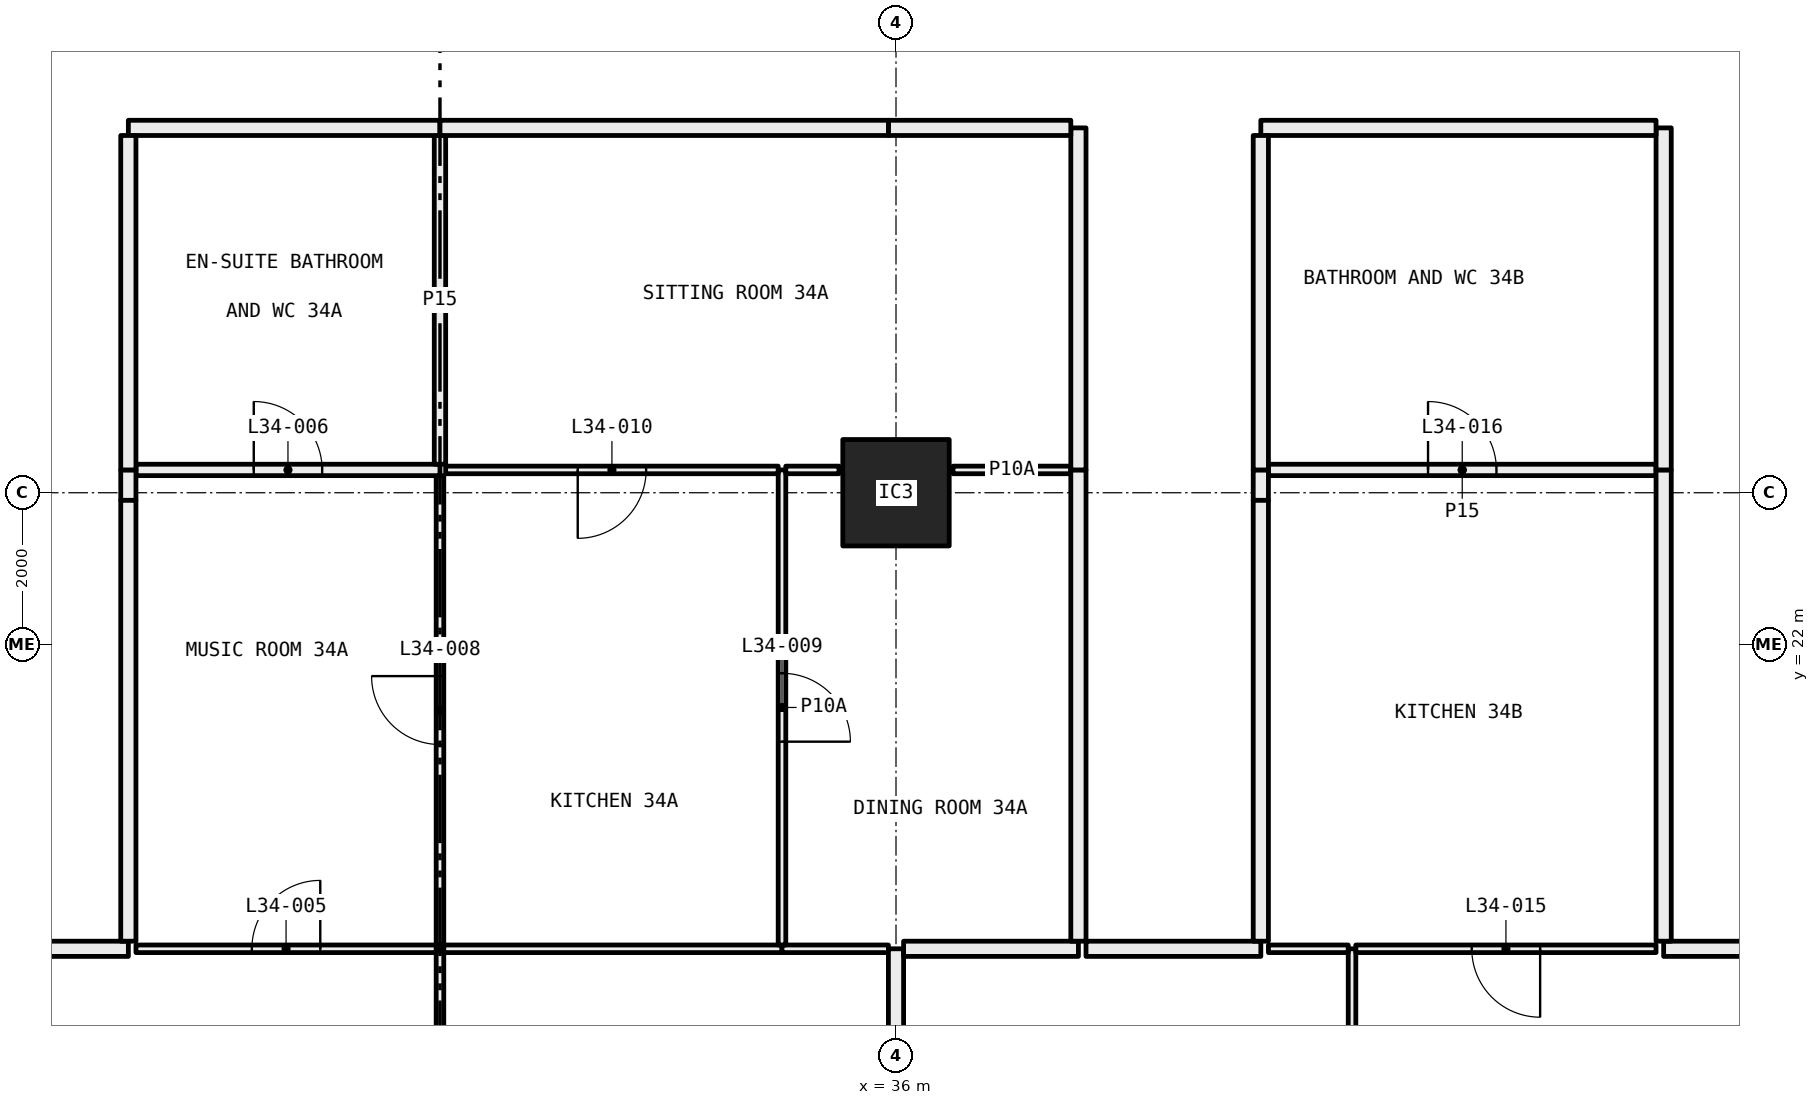
"""IFC4 building model, lengths in metres.
Left out: names, types, materials, properties, quantities, classifications, styles, units other than length and angle.
Written with IfcOpenShell. Run it as: python <this file> out.ifc"""

import sys

from ifc_helpers import new_model, si_unit, direction, frame, frame_2d, origin, origin_2d, place, context, subcontext, project, spatial, rectangle, hollow_rectangle, extrude, element, fill, save


model = new_model("IFC4")
c1 = context("Model", 3, precision=1e-05, world=origin(), true_north=direction((0.0, 1.0)))
c2 = subcontext(c1, "Body", "Model", "MODEL_VIEW")
j1 = project(units=[si_unit("LENGTHUNIT", "METRE"), si_unit("PLANEANGLEUNIT", "RADIAN")], contexts=[c1])
p1 = place(None, origin())
s1 = spatial("IfcSite", under=j1, at=p1, CompositionType="ELEMENT")
p2 = place(p1, origin())
s2 = spatial("IfcBuilding", under=s1, at=p2, CompositionType="ELEMENT")
p3 = place(p2, frame((0.0, 0.0, 131.1)))
s3 = spatial("IfcBuildingStorey", under=s2, at=p3, CompositionType="ELEMENT", Elevation=131.1)
p4 = place(p3, frame((36.0, 24.0, 0.0), z_axis=(0.0, 0.0, 1.0), x_axis=(1.0, 0.0, 0.0)))
e1 = element("IfcColumn", 1, at=p4, inside=s3, PredefinedType="COLUMN", context=c2, shape_type="SweptSolid", body=[
    extrude(hollow_rectangle(XDim=1.4, YDim=1.4, WallThickness=0.06, at=origin_2d()), origin(), (0.0, 0.0, 1.0), 3.05),
])
p5 = place(p3, frame((30.0, 12.72, 0.0), z_axis=(0.0, 0.0, 1.0), x_axis=(0.0, 1.0, 0.0)))
e2 = element("IfcWall", 2, at=p5, inside=s3, PredefinedType="PARTITIONING", context=c2, shape_type="SweptSolid", body=[
    extrude(rectangle(XDim=5.28, YDim=0.1, at=frame_2d((2.64, 0.0))), origin(), (0.0, 0.0, 1.0), 3.05),
])
p6 = place(p5, frame((2.19, 0.0, 0.0)))
e3 = element("IfcOpeningElement", 3, at=p6, cuts=e2, PredefinedType="OPENING", context=c2, shape_type="SweptSolid", body=[
    extrude(rectangle(XDim=0.9, YDim=2.1, at=frame_2d((0.45, 1.05))), frame((0.0, 0.06, 0.0), z_axis=(0.0, -1.0, 0.0), x_axis=(1.0, 0.0, 0.0)), (0.0, 0.0, 1.0), 0.12),
])
p7 = place(p3, frame((29.95, 18.0, 0.0), z_axis=(0.0, 0.0, 1.0), x_axis=(-1.0, 0.0, 0.0)))
e4 = element("IfcWall", 4, at=p7, inside=s3, PredefinedType="PARTITIONING", context=c2, shape_type="SweptSolid", body=[
    extrude(rectangle(XDim=3.95, YDim=0.1, at=frame_2d((1.975, 0.0))), origin(), (0.0, 0.0, 1.0), 3.05),
])
p8 = place(p7, frame((1.525, 0.0, 0.0)))
e5 = element("IfcOpeningElement", 5, at=p8, cuts=e4, PredefinedType="OPENING", context=c2, shape_type="SweptSolid", body=[
    extrude(rectangle(XDim=0.9, YDim=2.1, at=frame_2d((0.45, 1.05))), frame((0.0, 0.06, 0.0), z_axis=(0.0, -1.0, 0.0), x_axis=(1.0, 0.0, 0.0)), (0.0, 0.0, 1.0), 0.12),
])
p9 = place(p3, frame((25.9, 18.0, 0.0), z_axis=(0.0, 0.0, 1.0), x_axis=(-1.0, 0.0, 0.0)))
e6 = element("IfcWall", 6, at=p9, inside=s3, PredefinedType="PARTITIONING", context=c2, shape_type="SweptSolid", body=[
    extrude(rectangle(XDim=1.9, YDim=0.2, at=frame_2d((0.95, 0.0))), origin(), (0.0, 0.0, 1.0), 3.05),
])
p10 = place(p3, frame((34.5, 18.0, 0.0), z_axis=(0.0, 0.0, 1.0), x_axis=(-1.0, 0.0, 0.0)))
e7 = element("IfcWall", 7, at=p10, inside=s3, PredefinedType="PARTITIONING", context=c2, shape_type="SweptSolid", body=[
    extrude(rectangle(XDim=4.45, YDim=0.1, at=frame_2d((2.225, 0.0))), origin(), (0.0, 0.0, 1.0), 3.05),
])
p11 = place(p3, frame((35.9, 18.0, 0.0), z_axis=(0.0, 0.0, 1.0), x_axis=(-1.0, 0.0, 0.0)))
e8 = element("IfcWall", 8, at=p11, inside=s3, PredefinedType="PARTITIONING", context=c2, shape_type="SweptSolid", body=[
    extrude(rectangle(XDim=1.4, YDim=0.1, at=frame_2d((0.7, 0.0))), origin(), (0.0, 0.0, 1.0), 3.05),
])
p12 = place(p3, frame((36.0, 12.72, 0.0), z_axis=(0.0, 0.0, 1.0), x_axis=(0.0, 1.0, 0.0)))
e9 = element("IfcWall", 9, at=p12, inside=s3, PredefinedType="PARTITIONING", context=c2, shape_type="SweptSolid", body=[
    extrude(rectangle(XDim=5.28, YDim=0.2, at=frame_2d((2.64, 0.0))), origin(), (0.0, 0.0, 1.0), 2.45),
])
p13 = place(p3, frame((30.0, 18.05, 0.0), z_axis=(0.0, 0.0, 1.0), x_axis=(0.0, 1.0, 0.0)))
e10 = element("IfcWall", 10, at=p13, inside=s3, PredefinedType="PARTITIONING", context=c2, shape_type="SweptSolid", body=[
    extrude(rectangle(XDim=6.175, YDim=0.1, at=frame_2d((3.087, 0.0))), origin(), (0.0, 0.0, 1.0), 2.45),
])
p14 = place(p13, frame((2.637, 0.0, 0.0)))
e11 = element("IfcOpeningElement", 11, at=p14, cuts=e10, PredefinedType="OPENING", context=c2, shape_type="SweptSolid", body=[
    extrude(rectangle(XDim=0.9, YDim=2.1, at=frame_2d((0.45, 1.05))), frame((0.0, 0.06, 0.0), z_axis=(0.0, -1.0, 0.0), x_axis=(1.0, 0.0, 0.0)), (0.0, 0.0, 1.0), 0.12),
])
p15 = place(p3, frame((30.0, 24.3, 0.0), z_axis=(0.0, 0.0, 1.0), x_axis=(-1.0, 0.0, 0.0)))
e12 = element("IfcWall", 12, at=p15, inside=s3, PredefinedType="PARTITIONING", context=c2, shape_type="SweptSolid", body=[
    extrude(rectangle(XDim=4.0, YDim=0.15, at=frame_2d((2.0, 0.0))), origin(), (0.0, 0.0, 1.0), 3.05),
])
p16 = place(p15, frame((1.55, 0.0, 0.0)))
e13 = element("IfcOpeningElement", 13, at=p16, cuts=e12, PredefinedType="OPENING", context=c2, shape_type="SweptSolid", body=[
    extrude(rectangle(XDim=0.9, YDim=2.1, at=frame_2d((0.45, 1.05))), frame((0.0, 0.085, 0.0), z_axis=(0.0, -1.0, 0.0), x_axis=(1.0, 0.0, 0.0)), (0.0, 0.0, 1.0), 0.17),
])
p17 = place(p3, frame((25.9, 24.3, 0.0), z_axis=(0.0, 0.0, 1.0), x_axis=(0.0, -1.0, 0.0)))
e14 = element("IfcWall", 14, at=p17, inside=s3, PredefinedType="PARTITIONING", context=c2, shape_type="SweptSolid", body=[
    extrude(rectangle(XDim=0.4, YDim=0.2, at=frame_2d((0.2, 0.0))), origin(), (0.0, 0.0, 1.0), 2.45),
])
p18 = place(p3, frame((25.9, 23.9, 0.0), z_axis=(0.0, 0.0, 1.0), x_axis=(0.0, -1.0, 0.0)))
e15 = element("IfcWall", 15, at=p18, inside=s3, PredefinedType="PARTITIONING", context=c2, shape_type="SweptSolid", body=[
    extrude(rectangle(XDim=5.8, YDim=0.2, at=frame_2d((2.9, 0.0))), origin(), (0.0, 0.0, 1.0), 3.05),
])
p19 = place(p3, frame((34.5, 18.05, 0.0), z_axis=(0.0, 0.0, 1.0), x_axis=(0.0, 1.0, 0.0)))
e16 = element("IfcWall", 16, at=p19, inside=s3, PredefinedType="PARTITIONING", context=c2, shape_type="SweptSolid", body=[
    extrude(rectangle(XDim=6.25, YDim=0.1, at=frame_2d((3.125, 0.0))), origin(), (0.0, 0.0, 1.0), 2.45),
])
p20 = place(p19, frame((2.675, 0.0, 0.0)))
e17 = element("IfcOpeningElement", 17, at=p20, cuts=e16, PredefinedType="OPENING", context=c2, shape_type="SweptSolid", body=[
    extrude(rectangle(XDim=0.9, YDim=2.1, at=frame_2d((0.45, 1.05))), frame((0.0, 0.06, 0.0), z_axis=(0.0, -1.0, 0.0), x_axis=(1.0, 0.0, 0.0)), (0.0, 0.0, 1.0), 0.12),
])
p21 = place(p3, frame((34.45, 24.3, 0.0), z_axis=(0.0, 0.0, 1.0), x_axis=(-1.0, 0.0, 0.0)))
e18 = element("IfcWall", 18, at=p21, inside=s3, PredefinedType="PARTITIONING", context=c2, shape_type="SweptSolid", body=[
    extrude(rectangle(XDim=4.375, YDim=0.1, at=frame_2d((2.188, 0.0))), origin(), (0.0, 0.0, 1.0), 3.05),
])
p22 = place(p21, frame((1.738, 0.0, 0.0)))
e19 = element("IfcOpeningElement", 19, at=p22, cuts=e18, PredefinedType="OPENING", context=c2, shape_type="SweptSolid", body=[
    extrude(rectangle(XDim=0.9, YDim=2.1, at=frame_2d((0.45, 1.05))), frame((0.0, 0.06, 0.0), z_axis=(0.0, -1.0, 0.0), x_axis=(1.0, 0.0, 0.0)), (0.0, 0.0, 1.0), 0.12),
])
p23 = place(p3, frame((35.25, 24.3, 0.0), z_axis=(0.0, 0.0, 1.0), x_axis=(-1.0, 0.0, 0.0)))
e20 = element("IfcWall", 20, at=p23, inside=s3, PredefinedType="PARTITIONING", context=c2, shape_type="SweptSolid", body=[
    extrude(rectangle(XDim=0.7, YDim=0.1, at=frame_2d((0.35, 0.0))), origin(), (0.0, 0.0, 1.0), 3.05),
])
p24 = place(p3, frame((38.3, 24.3, 0.0), z_axis=(0.0, 0.0, 1.0), x_axis=(-1.0, 0.0, 0.0)))
e21 = element("IfcWall", 21, at=p24, inside=s3, PredefinedType="PARTITIONING", context=c2, shape_type="SweptSolid", body=[
    extrude(rectangle(XDim=1.55, YDim=0.1, at=frame_2d((0.775, 0.0))), origin(), (0.0, 0.0, 1.0), 3.05),
])
p25 = place(p3, frame((36.1, 18.0, 0.0), z_axis=(0.0, 0.0, 1.0), x_axis=(1.0, 0.0, 0.0)))
e22 = element("IfcWall", 22, at=p25, inside=s3, PredefinedType="PARTITIONING", context=c2, shape_type="SweptSolid", body=[
    extrude(rectangle(XDim=2.3, YDim=0.2, at=frame_2d((1.15, 0.0))), origin(), (0.0, 0.0, 1.0), 3.05),
])
p26 = place(p3, frame((38.4, 18.1, 0.0), z_axis=(0.0, 0.0, 1.0), x_axis=(0.0, 1.0, 0.0)))
e23 = element("IfcWall", 23, at=p26, inside=s3, PredefinedType="PARTITIONING", context=c2, shape_type="SweptSolid", body=[
    extrude(rectangle(XDim=6.2, YDim=0.2, at=frame_2d((3.1, 0.0))), origin(), (0.0, 0.0, 1.0), 2.45),
])
p27 = place(p3, frame((30.0, 24.375, 0.0), z_axis=(0.0, 0.0, 1.0), x_axis=(0.0, 1.0, 0.0)))
e24 = element("IfcWall", 24, at=p27, inside=s3, PredefinedType="PARTITIONING", context=c2, shape_type="SweptSolid", body=[
    extrude(rectangle(XDim=4.325, YDim=0.15, at=frame_2d((2.163, 0.0))), origin(), (0.0, 0.0, 1.0), 3.05),
])
p28 = place(p3, frame((30.0, 28.8, 0.0), z_axis=(0.0, 0.0, 1.0), x_axis=(-1.0, 0.0, 0.0)))
e25 = element("IfcWall", 25, at=p28, inside=s3, PredefinedType="PARTITIONING", context=c2, shape_type="SweptSolid", body=[
    extrude(rectangle(XDim=4.1, YDim=0.2, at=frame_2d((2.05, 0.0))), origin(), (0.0, 0.0, 1.0), 3.05),
])
p29 = place(p3, frame((25.9, 28.7, 0.0), z_axis=(0.0, 0.0, 1.0), x_axis=(0.0, -1.0, 0.0)))
e26 = element("IfcWall", 26, at=p29, inside=s3, PredefinedType="PARTITIONING", context=c2, shape_type="SweptSolid", body=[
    extrude(rectangle(XDim=4.4, YDim=0.2, at=frame_2d((2.2, 0.0))), origin(), (0.0, 0.0, 1.0), 3.05),
])
p30 = place(p3, frame((38.4, 24.3, 0.0), z_axis=(0.0, 0.0, 1.0), x_axis=(0.0, 1.0, 0.0)))
e27 = element("IfcWall", 27, at=p30, inside=s3, PredefinedType="PARTITIONING", context=c2, shape_type="SweptSolid", body=[
    extrude(rectangle(XDim=4.5, YDim=0.2, at=frame_2d((2.25, 0.0))), origin(), (0.0, 0.0, 1.0), 3.05),
])
p31 = place(p3, frame((38.3, 28.8, 0.0), z_axis=(0.0, 0.0, 1.0), x_axis=(-1.0, 0.0, 0.0)))
e28 = element("IfcWall", 28, at=p31, inside=s3, PredefinedType="PARTITIONING", context=c2, shape_type="SweptSolid", body=[
    extrude(rectangle(XDim=2.4, YDim=0.2, at=frame_2d((1.2, 0.0))), origin(), (0.0, 0.0, 1.0), 2.45),
])
p32 = place(p3, frame((35.9, 28.8, 0.0), z_axis=(0.0, 0.0, 1.0), x_axis=(-1.0, 0.0, 0.0)))
e29 = element("IfcWall", 29, at=p32, inside=s3, PredefinedType="PARTITIONING", context=c2, shape_type="SweptSolid", body=[
    extrude(rectangle(XDim=5.9, YDim=0.2, at=frame_2d((2.95, 0.0))), origin(), (0.0, 0.0, 1.0), 3.05),
])
p33 = place(p3, frame((42.0, 12.72, 0.0), z_axis=(0.0, 0.0, 1.0), x_axis=(0.0, 1.0, 0.0)))
e30 = element("IfcWall", 30, at=p33, inside=s3, PredefinedType="PARTITIONING", context=c2, shape_type="SweptSolid", body=[
    extrude(rectangle(XDim=5.28, YDim=0.1, at=frame_2d((2.64, 0.0))), origin(), (0.0, 0.0, 1.0), 3.05),
])
p34 = place(p33, frame((2.19, 0.0, 0.0)))
e31 = element("IfcOpeningElement", 31, at=p34, cuts=e30, PredefinedType="OPENING", context=c2, shape_type="SweptSolid", body=[
    extrude(rectangle(XDim=0.9, YDim=2.1, at=frame_2d((0.45, 1.05))), frame((0.0, 0.06, 0.0), z_axis=(0.0, -1.0, 0.0), x_axis=(1.0, 0.0, 0.0)), (0.0, 0.0, 1.0), 0.12),
])
p35 = place(p3, frame((41.95, 18.0, 0.0), z_axis=(0.0, 0.0, 1.0), x_axis=(-1.0, 0.0, 0.0)))
e32 = element("IfcWall", 32, at=p35, inside=s3, PredefinedType="PARTITIONING", context=c2, shape_type="SweptSolid", body=[
    extrude(rectangle(XDim=1.05, YDim=0.1, at=frame_2d((0.525, 0.0))), origin(), (0.0, 0.0, 1.0), 3.05),
])
p36 = place(p3, frame((40.8, 18.0, 0.0), z_axis=(0.0, 0.0, 1.0), x_axis=(-1.0, 0.0, 0.0)))
e33 = element("IfcWall", 33, at=p36, inside=s3, PredefinedType="PARTITIONING", context=c2, shape_type="SweptSolid", body=[
    extrude(rectangle(XDim=2.3, YDim=0.2, at=frame_2d((1.15, 0.0))), origin(), (0.0, 0.0, 1.0), 3.05),
])
p37 = place(p3, frame((46.0, 18.0, 0.0), z_axis=(0.0, 0.0, 1.0), x_axis=(-1.0, 0.0, 0.0)))
e34 = element("IfcWall", 34, at=p37, inside=s3, PredefinedType="PARTITIONING", context=c2, shape_type="SweptSolid", body=[
    extrude(rectangle(XDim=3.95, YDim=0.1, at=frame_2d((1.975, 0.0))), origin(), (0.0, 0.0, 1.0), 3.05),
])
p38 = place(p37, frame((1.525, 0.0, 0.0)))
e35 = element("IfcOpeningElement", 35, at=p38, cuts=e34, PredefinedType="OPENING", context=c2, shape_type="SweptSolid", body=[
    extrude(rectangle(XDim=0.9, YDim=2.1, at=frame_2d((0.45, 1.05))), frame((0.0, 0.06, 0.0), z_axis=(0.0, -1.0, 0.0), x_axis=(1.0, 0.0, 0.0)), (0.0, 0.0, 1.0), 0.12),
])
p39 = place(p3, frame((48.0, 18.0, 0.0), z_axis=(0.0, 0.0, 1.0), x_axis=(-1.0, 0.0, 0.0)))
e36 = element("IfcWall", 36, at=p39, inside=s3, PredefinedType="PARTITIONING", context=c2, shape_type="SweptSolid", body=[
    extrude(rectangle(XDim=1.9, YDim=0.2, at=frame_2d((0.95, 0.0))), origin(), (0.0, 0.0, 1.0), 3.05),
])
p40 = place(p3, frame((46.0, 24.3, 0.0), z_axis=(0.0, 0.0, 1.0), x_axis=(-1.0, 0.0, 0.0)))
e37 = element("IfcWall", 37, at=p40, inside=s3, PredefinedType="PARTITIONING", context=c2, shape_type="SweptSolid", body=[
    extrude(rectangle(XDim=5.1, YDim=0.15, at=frame_2d((2.55, 0.0))), origin(), (0.0, 0.0, 1.0), 3.05),
])
p41 = place(p40, frame((2.1, 0.0, 0.0)))
e38 = element("IfcOpeningElement", 38, at=p41, cuts=e37, PredefinedType="OPENING", context=c2, shape_type="SweptSolid", body=[
    extrude(rectangle(XDim=0.9, YDim=2.1, at=frame_2d((0.45, 1.05))), frame((0.0, 0.085, 0.0), z_axis=(0.0, -1.0, 0.0), x_axis=(1.0, 0.0, 0.0)), (0.0, 0.0, 1.0), 0.17),
])
p42 = place(p3, frame((40.8, 24.3, 0.0), z_axis=(0.0, 0.0, 1.0), x_axis=(0.0, -1.0, 0.0)))
e39 = element("IfcWall", 39, at=p42, inside=s3, PredefinedType="PARTITIONING", context=c2, shape_type="SweptSolid", body=[
    extrude(rectangle(XDim=0.4, YDim=0.2, at=frame_2d((0.2, 0.0))), origin(), (0.0, 0.0, 1.0), 2.45),
])
p43 = place(p3, frame((40.8, 23.9, 0.0), z_axis=(0.0, 0.0, 1.0), x_axis=(0.0, -1.0, 0.0)))
e40 = element("IfcWall", 40, at=p43, inside=s3, PredefinedType="PARTITIONING", context=c2, shape_type="SweptSolid", body=[
    extrude(rectangle(XDim=5.8, YDim=0.2, at=frame_2d((2.9, 0.0))), origin(), (0.0, 0.0, 1.0), 3.05),
])
p44 = place(p3, frame((46.1, 18.1, 0.0), z_axis=(0.0, 0.0, 1.0), x_axis=(0.0, 1.0, 0.0)))
e41 = element("IfcWall", 41, at=p44, inside=s3, PredefinedType="PARTITIONING", context=c2, shape_type="SweptSolid", body=[
    extrude(rectangle(XDim=6.2, YDim=0.2, at=frame_2d((3.1, 0.0))), origin(), (0.0, 0.0, 1.0), 2.45),
])
p45 = place(p3, frame((46.1, 24.3, 0.0), z_axis=(0.0, 0.0, 1.0), x_axis=(0.0, 1.0, 0.0)))
e42 = element("IfcWall", 42, at=p45, inside=s3, PredefinedType="PARTITIONING", context=c2, shape_type="SweptSolid", body=[
    extrude(rectangle(XDim=4.5, YDim=0.2, at=frame_2d((2.25, 0.0))), origin(), (0.0, 0.0, 1.0), 3.05),
])
p46 = place(p3, frame((46.0, 28.8, 0.0), z_axis=(0.0, 0.0, 1.0), x_axis=(-1.0, 0.0, 0.0)))
e43 = element("IfcWall", 43, at=p46, inside=s3, PredefinedType="PARTITIONING", context=c2, shape_type="SweptSolid", body=[
    extrude(rectangle(XDim=5.2, YDim=0.2, at=frame_2d((2.6, 0.0))), origin(), (0.0, 0.0, 1.0), 3.05),
])
p47 = place(p3, frame((40.8, 28.7, 0.0), z_axis=(0.0, 0.0, 1.0), x_axis=(0.0, -1.0, 0.0)))
e44 = element("IfcWall", 44, at=p47, inside=s3, PredefinedType="PARTITIONING", context=c2, shape_type="SweptSolid", body=[
    extrude(rectangle(XDim=4.4, YDim=0.2, at=frame_2d((2.2, 0.0))), origin(), (0.0, 0.0, 1.0), 3.05),
])
p48 = place(p8, frame((0.9, 0.0, 0.0), x_axis=(-1.0, 0.0, 0.0)))
e45 = element("IfcDoor", 45, at=p48, inside=s3, OperationType="SINGLE_SWING_LEFT", PredefinedType="DOOR", context=c2, shape_type="SweptSolid", body=[
    extrude(rectangle(XDim=0.9, YDim=2.1, at=frame_2d((0.45, 1.05))), frame((0.0, 0.025, 0.0), z_axis=(0.0, -1.0, 0.0), x_axis=(1.0, 0.0, 0.0)), (0.0, 0.0, 1.0), 0.05),
])
fill(e5, e45)
p49 = place(p16, frame((0.9, 0.0, 0.0), x_axis=(-1.0, 0.0, 0.0)))
e46 = element("IfcDoor", 46, at=p49, inside=s3, OperationType="SINGLE_SWING_RIGHT", PredefinedType="DOOR", context=c2, shape_type="SweptSolid", body=[
    extrude(rectangle(XDim=0.9, YDim=2.1, at=frame_2d((0.45, 1.05))), frame((0.0, 0.025, 0.0), z_axis=(0.0, -1.0, 0.0), x_axis=(1.0, 0.0, 0.0)), (0.0, 0.0, 1.0), 0.05),
])
fill(e13, e46)
p50 = place(p14, origin())
e47 = element("IfcDoor", 47, at=p50, inside=s3, OperationType="SINGLE_SWING_LEFT", PredefinedType="DOOR", context=c2, shape_type="SweptSolid", body=[
    extrude(rectangle(XDim=0.9, YDim=2.1, at=frame_2d((0.45, 1.05))), frame((0.0, 0.025, 0.0), z_axis=(0.0, -1.0, 0.0), x_axis=(1.0, 0.0, 0.0)), (0.0, 0.0, 1.0), 0.05),
])
fill(e11, e47)
p51 = place(p20, frame((0.9, 0.0, 0.0), x_axis=(-1.0, 0.0, 0.0)))
e48 = element("IfcDoor", 48, at=p51, inside=s3, OperationType="SINGLE_SWING_LEFT", PredefinedType="DOOR", context=c2, shape_type="SweptSolid", body=[
    extrude(rectangle(XDim=0.9, YDim=2.1, at=frame_2d((0.45, 1.05))), frame((0.0, 0.025, 0.0), z_axis=(0.0, -1.0, 0.0), x_axis=(1.0, 0.0, 0.0)), (0.0, 0.0, 1.0), 0.05),
])
fill(e17, e48)
p52 = place(p22, origin())
e49 = element("IfcDoor", 49, at=p52, inside=s3, OperationType="SINGLE_SWING_LEFT", PredefinedType="DOOR", context=c2, shape_type="SweptSolid", body=[
    extrude(rectangle(XDim=0.9, YDim=2.1, at=frame_2d((0.45, 1.05))), frame((0.0, 0.025, 0.0), z_axis=(0.0, -1.0, 0.0), x_axis=(1.0, 0.0, 0.0)), (0.0, 0.0, 1.0), 0.05),
])
fill(e19, e49)
p53 = place(p38, origin())
e50 = element("IfcDoor", 50, at=p53, inside=s3, OperationType="SINGLE_SWING_RIGHT", PredefinedType="DOOR", context=c2, shape_type="SweptSolid", body=[
    extrude(rectangle(XDim=0.9, YDim=2.1, at=frame_2d((0.45, 1.05))), frame((0.0, 0.025, 0.0), z_axis=(0.0, -1.0, 0.0), x_axis=(1.0, 0.0, 0.0)), (0.0, 0.0, 1.0), 0.05),
])
fill(e35, e50)
p54 = place(p41, frame((0.9, 0.0, 0.0), x_axis=(-1.0, 0.0, 0.0)))
e51 = element("IfcDoor", 51, at=p54, inside=s3, OperationType="SINGLE_SWING_RIGHT", PredefinedType="DOOR", context=c2, shape_type="SweptSolid", body=[
    extrude(rectangle(XDim=0.9, YDim=2.1, at=frame_2d((0.45, 1.05))), frame((0.0, 0.025, 0.0), z_axis=(0.0, -1.0, 0.0), x_axis=(1.0, 0.0, 0.0)), (0.0, 0.0, 1.0), 0.05),
])
fill(e38, e51)
save(model, sys.argv[1])
